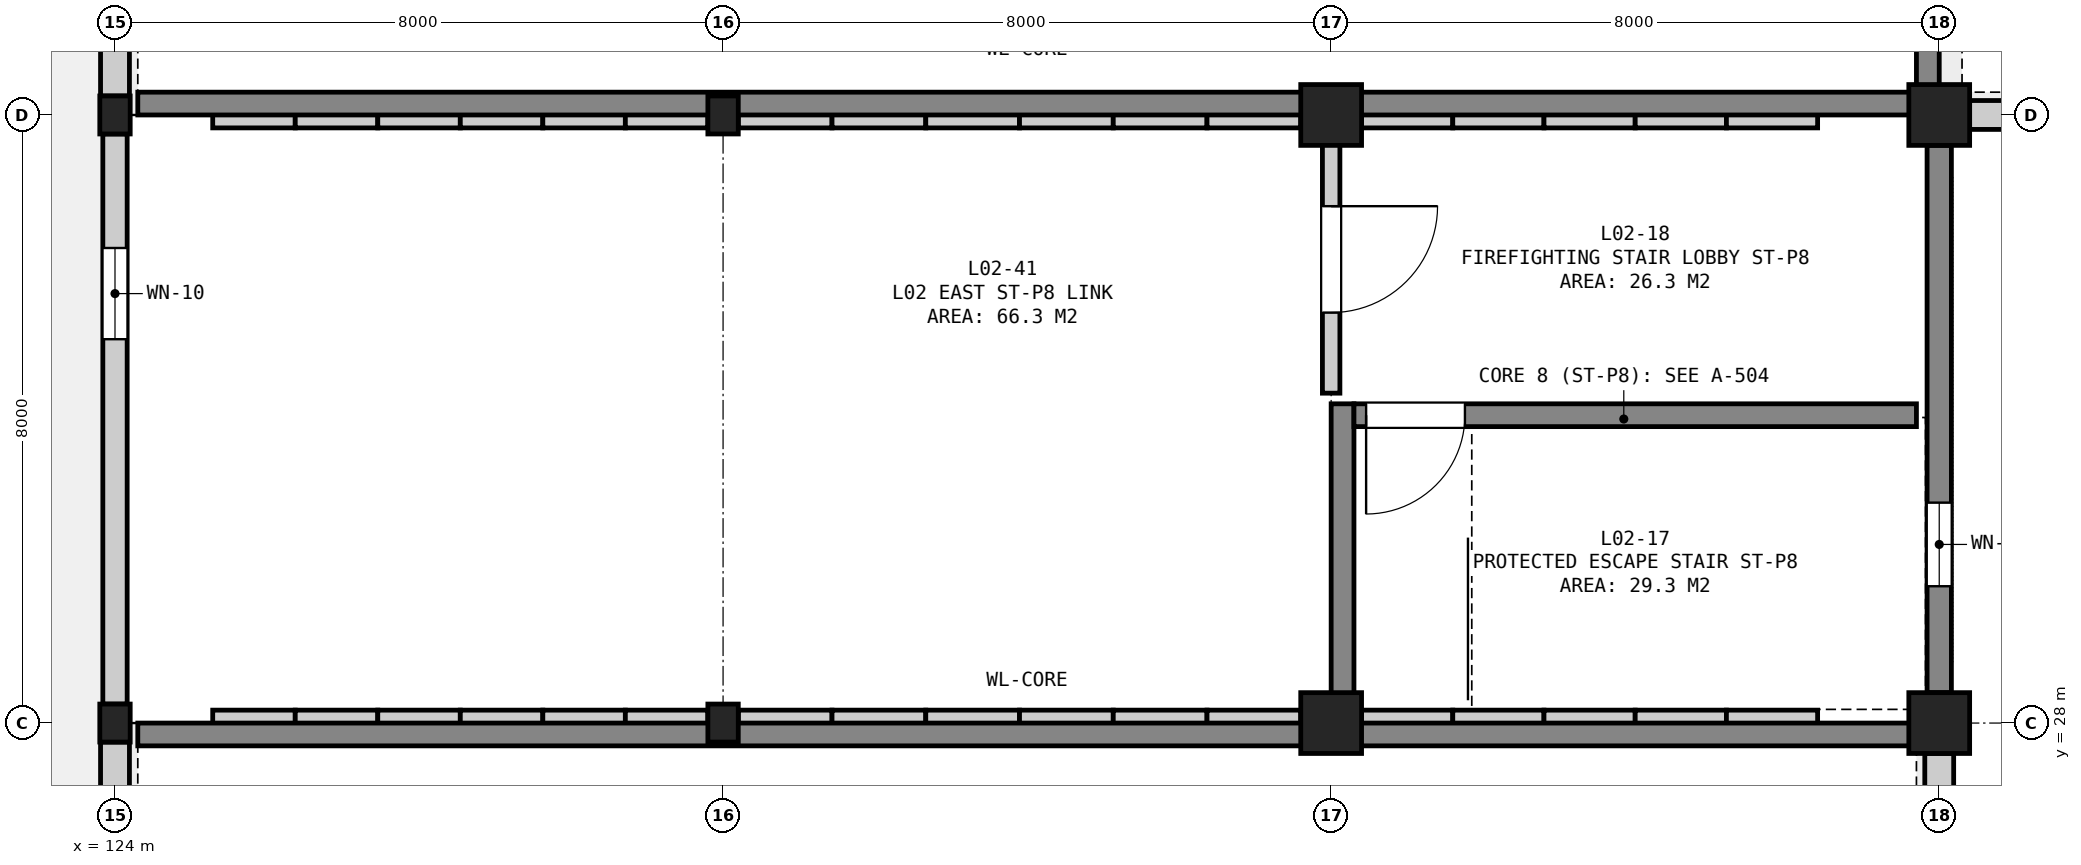
"""IFC4 building model, lengths in metres.
Left out: names, types, materials, properties, quantities, classifications, styles, units other than length and angle.
Written with IfcOpenShell. Run it as: python <this file> out.ifc"""

import sys

from ifc_helpers import new_model, si_unit, direction, frame, frame_2d, origin, origin_2d, place, context, subcontext, project, spatial, rectangle, extrude, element, fill, save


model = new_model("IFC4")
c1 = context("Model", 3, precision=1e-05, world=origin(), true_north=direction((0.0, 1.0)))
c2 = subcontext(c1, "Body", "Model", "MODEL_VIEW")
j1 = project(units=[si_unit("LENGTHUNIT", "METRE"), si_unit("PLANEANGLEUNIT", "RADIAN")], contexts=[c1])
p1 = place(None, origin())
s1 = spatial("IfcSite", under=j1, at=p1, CompositionType="ELEMENT")
p2 = place(p1, origin())
s2 = spatial("IfcBuilding", under=s1, at=p2, CompositionType="ELEMENT")
p3 = place(p2, frame((0.0, 0.0, 10.8)))
s3 = spatial("IfcBuildingStorey", under=s2, at=p3, CompositionType="ELEMENT", Elevation=10.8)
for number, where, z_axis, x_axis in (
    (1, (124.0, 28.0, 0.0), (0.0, 0.0, 1.0), (1.0, 0.0, 0.0)),
    (2, (124.0, 36.0, 0.0), (0.0, 0.0, 1.0), (1.0, 0.0, 0.0)),
    (3, (132.0, 28.0, 0.0), (0.0, 0.0, 1.0), (1.0, 0.0, 0.0)),
    (4, (132.0, 36.0, 0.0), (0.0, 0.0, 1.0), (1.0, 0.0, 0.0)),
):
    element("IfcColumn", number, at=place(p3, frame(where, z_axis=z_axis, x_axis=x_axis)), inside=s3, PredefinedType="COLUMN", context=c2, shape_type="SweptSolid", body=[
        extrude(rectangle(XDim=0.4, YDim=0.5, at=origin_2d()), origin(), (0.0, 0.0, 1.0), 4.8),
    ])
for number, where, z_axis, x_axis in (
    (5, (140.0, 28.0, 0.0), (0.0, 0.0, 1.0), (1.0, 0.0, 0.0)),
    (6, (140.0, 36.0, 0.0), (0.0, 0.0, 1.0), (1.0, 0.0, 0.0)),
    (7, (148.0, 28.0, 0.0), (0.0, 0.0, 1.0), (1.0, 0.0, 0.0)),
    (8, (148.0, 36.0, 0.0), (0.0, 0.0, 1.0), (1.0, 0.0, 0.0)),
):
    element("IfcColumn", number, at=place(p3, frame(where, z_axis=z_axis, x_axis=x_axis)), inside=s3, PredefinedType="COLUMN", context=c2, shape_type="SweptSolid", body=[
        extrude(rectangle(XDim=0.8, YDim=0.8, at=origin_2d()), origin(), (0.0, 0.0, 1.0), 4.8),
    ])
p4 = place(p3, frame((124.0, 42.775, 0.0), z_axis=(0.0, 0.0, 1.0), x_axis=(0.0, -1.0, 0.0)))
e9 = element("IfcWall", 9, at=p4, inside=s3, PredefinedType="SOLIDWALL", context=c2, shape_type="SweptSolid", body=[
    extrude(rectangle(XDim=6.525, YDim=0.38, at=frame_2d((3.262, 0.0))), origin(), (0.0, 0.0, 1.0), 3.95),
])
p5 = place(p3, frame((124.0, 35.75, 0.0), z_axis=(0.0, 0.0, 1.0), x_axis=(0.0, -1.0, 0.0)))
e10 = element("IfcWall", 10, at=p5, inside=s3, PredefinedType="SOLIDWALL", context=c2, shape_type="SweptSolid", body=[
    extrude(rectangle(XDim=7.5, YDim=0.32, at=frame_2d((3.75, 0.0))), origin(), (0.0, 0.0, 1.0), 3.9),
])
p6 = place(p5, frame((1.5, 0.0, 0.9)))
e11 = element("IfcOpeningElement", 11, at=p6, cuts=e10, PredefinedType="OPENING", context=c2, shape_type="SweptSolid", body=[
    extrude(rectangle(XDim=1.2, YDim=1.7, at=frame_2d((0.6, 0.85))), frame((0.0, 0.172, 0.0), z_axis=(0.0, -1.0, 0.0), x_axis=(1.0, 0.0, 0.0)), (0.0, 0.0, 1.0), 0.344),
])
p7 = place(p3, frame((124.0, 27.75, 0.0), z_axis=(0.0, 0.0, 1.0), x_axis=(0.0, -1.0, 0.0)))
e12 = element("IfcWall", 12, at=p7, inside=s3, PredefinedType="SOLIDWALL", context=c2, shape_type="SweptSolid", body=[
    extrude(rectangle(XDim=14.625, YDim=0.38, at=frame_2d((7.312, 0.0))), origin(), (0.0, 0.0, 1.0), 3.7),
])
p8 = place(p3, frame((148.0, 13.05, 0.0), z_axis=(0.0, 0.0, 1.0), x_axis=(0.0, 1.0, 0.0)))
e13 = element("IfcWall", 13, at=p8, inside=s3, PredefinedType="SOLIDWALL", context=c2, shape_type="SweptSolid", body=[
    extrude(rectangle(XDim=14.55, YDim=0.38, at=frame_2d((7.275, 0.0))), origin(), (0.0, 0.0, 1.0), 3.7),
])
p9 = place(p3, frame((148.0, 28.4, 0.0), z_axis=(0.0, 0.0, 1.0), x_axis=(0.0, 1.0, 0.0)))
e14 = element("IfcWall", 14, at=p9, inside=s3, PredefinedType="SOLIDWALL", context=c2, shape_type="SweptSolid", body=[
    extrude(rectangle(XDim=7.2, YDim=0.32, at=frame_2d((3.6, 0.0))), origin(), (0.0, 0.0, 1.0), 3.895),
])
p10 = place(p9, frame((1.4, 0.0, 0.9)))
e15 = element("IfcOpeningElement", 15, at=p10, cuts=e14, PredefinedType="OPENING", context=c2, shape_type="SweptSolid", body=[
    extrude(rectangle(XDim=1.1, YDim=1.55, at=frame_2d((0.55, 0.775))), frame((0.0, 0.172, 0.0), z_axis=(0.0, -1.0, 0.0), x_axis=(1.0, 0.0, 0.0)), (0.0, 0.0, 1.0), 0.344),
])
p11 = place(p3, frame((148.4, 36.0, 0.0), z_axis=(0.0, 0.0, 1.0), x_axis=(1.0, 0.0, 0.0)))
e16 = element("IfcWall", 16, at=p11, inside=s3, PredefinedType="SOLIDWALL", context=c2, shape_type="SweptSolid", body=[
    extrude(rectangle(XDim=12.875, YDim=0.38, at=frame_2d((6.438, 0.0))), origin(), (0.0, 0.0, 1.0), 3.7),
])
p12 = place(p3, frame((125.286, 28.0, 4.8), z_axis=(0.0, 0.0, 1.0), x_axis=(1.0, 0.0, 0.0)))
e17 = element("IfcWall", 17, at=p12, inside=s3, PredefinedType="SOLIDWALL", context=c2, shape_type="SweptSolid", body=[
    extrude(rectangle(XDim=1.086, YDim=0.34, at=frame_2d((0.543, 0.0))), origin(), (0.0, 0.0, 1.0), 0.321),
])
p13 = place(p3, frame((126.371, 28.0, 4.8), z_axis=(0.0, 0.0, 1.0), x_axis=(1.0, 0.0, 0.0)))
e18 = element("IfcWall", 18, at=p13, inside=s3, PredefinedType="SOLIDWALL", context=c2, shape_type="SweptSolid", body=[
    extrude(rectangle(XDim=1.086, YDim=0.34, at=frame_2d((0.543, 0.0))), origin(), (0.0, 0.0, 1.0), 0.591),
])
p14 = place(p3, frame((127.457, 28.0, 4.8), z_axis=(0.0, 0.0, 1.0), x_axis=(1.0, 0.0, 0.0)))
e19 = element("IfcWall", 19, at=p14, inside=s3, PredefinedType="SOLIDWALL", context=c2, shape_type="SweptSolid", body=[
    extrude(rectangle(XDim=1.086, YDim=0.34, at=frame_2d((0.543, 0.0))), origin(), (0.0, 0.0, 1.0), 0.862),
])
p15 = place(p3, frame((128.543, 28.0, 4.8), z_axis=(0.0, 0.0, 1.0), x_axis=(1.0, 0.0, 0.0)))
e20 = element("IfcWall", 20, at=p15, inside=s3, PredefinedType="SOLIDWALL", context=c2, shape_type="SweptSolid", body=[
    extrude(rectangle(XDim=1.086, YDim=0.34, at=frame_2d((0.543, 0.0))), origin(), (0.0, 0.0, 1.0), 1.133),
])
p16 = place(p3, frame((129.629, 28.0, 4.8), z_axis=(0.0, 0.0, 1.0), x_axis=(1.0, 0.0, 0.0)))
e21 = element("IfcWall", 21, at=p16, inside=s3, PredefinedType="SOLIDWALL", context=c2, shape_type="SweptSolid", body=[
    extrude(rectangle(XDim=1.086, YDim=0.34, at=frame_2d((0.543, 0.0))), origin(), (0.0, 0.0, 1.0), 1.403),
])
p17 = place(p3, frame((130.714, 28.0, 4.8), z_axis=(0.0, 0.0, 1.0), x_axis=(1.0, 0.0, 0.0)))
e22 = element("IfcWall", 22, at=p17, inside=s3, PredefinedType="SOLIDWALL", context=c2, shape_type="SweptSolid", body=[
    extrude(rectangle(XDim=1.086, YDim=0.34, at=frame_2d((0.543, 0.0))), origin(), (0.0, 0.0, 1.0), 1.674),
])
p18 = place(p3, frame((132.2, 28.0, 4.8), z_axis=(0.0, 0.0, 1.0), x_axis=(1.0, 0.0, 0.0)))
e23 = element("IfcWall", 23, at=p18, inside=s3, PredefinedType="SOLIDWALL", context=c2, shape_type="SweptSolid", body=[
    extrude(rectangle(XDim=1.233, YDim=0.34, at=frame_2d((0.617, 0.0))), origin(), (0.0, 0.0, 1.0), 2.044),
])
p19 = place(p3, frame((133.433, 28.0, 4.8), z_axis=(0.0, 0.0, 1.0), x_axis=(1.0, 0.0, 0.0)))
e24 = element("IfcWall", 24, at=p19, inside=s3, PredefinedType="SOLIDWALL", context=c2, shape_type="SweptSolid", body=[
    extrude(rectangle(XDim=1.233, YDim=0.34, at=frame_2d((0.617, 0.0))), origin(), (0.0, 0.0, 1.0), 2.352),
])
p20 = place(p3, frame((134.667, 28.0, 4.8), z_axis=(0.0, 0.0, 1.0), x_axis=(1.0, 0.0, 0.0)))
e25 = element("IfcWall", 25, at=p20, inside=s3, PredefinedType="SOLIDWALL", context=c2, shape_type="SweptSolid", body=[
    extrude(rectangle(XDim=1.233, YDim=0.34, at=frame_2d((0.617, 0.0))), origin(), (0.0, 0.0, 1.0), 2.659),
])
p21 = place(p3, frame((135.9, 28.0, 4.8), z_axis=(0.0, 0.0, 1.0), x_axis=(1.0, 0.0, 0.0)))
e26 = element("IfcWall", 26, at=p21, inside=s3, PredefinedType="SOLIDWALL", context=c2, shape_type="SweptSolid", body=[
    extrude(rectangle(XDim=1.233, YDim=0.34, at=frame_2d((0.617, 0.0))), origin(), (0.0, 0.0, 1.0), 2.709),
])
p22 = place(p3, frame((137.133, 28.0, 4.8), z_axis=(0.0, 0.0, 1.0), x_axis=(1.0, 0.0, 0.0)))
e27 = element("IfcWall", 27, at=p22, inside=s3, PredefinedType="SOLIDWALL", context=c2, shape_type="SweptSolid", body=[
    extrude(rectangle(XDim=1.233, YDim=0.34, at=frame_2d((0.617, 0.0))), origin(), (0.0, 0.0, 1.0), 2.402),
])
p23 = place(p3, frame((138.367, 28.0, 4.8), z_axis=(0.0, 0.0, 1.0), x_axis=(1.0, 0.0, 0.0)))
e28 = element("IfcWall", 28, at=p23, inside=s3, PredefinedType="SOLIDWALL", context=c2, shape_type="SweptSolid", body=[
    extrude(rectangle(XDim=1.233, YDim=0.34, at=frame_2d((0.617, 0.0))), origin(), (0.0, 0.0, 1.0), 2.094),
])
p24 = place(p3, frame((140.4, 28.0, 4.8), z_axis=(0.0, 0.0, 1.0), x_axis=(1.0, 0.0, 0.0)))
e29 = element("IfcWall", 29, at=p24, inside=s3, PredefinedType="SOLIDWALL", context=c2, shape_type="SweptSolid", body=[
    extrude(rectangle(XDim=1.2, YDim=0.34, at=frame_2d((0.6, 0.0))), origin(), (0.0, 0.0, 1.0), 1.596),
])
p25 = place(p3, frame((141.6, 28.0, 4.8), z_axis=(0.0, 0.0, 1.0), x_axis=(1.0, 0.0, 0.0)))
e30 = element("IfcWall", 30, at=p25, inside=s3, PredefinedType="SOLIDWALL", context=c2, shape_type="SweptSolid", body=[
    extrude(rectangle(XDim=1.2, YDim=0.34, at=frame_2d((0.6, 0.0))), origin(), (0.0, 0.0, 1.0), 1.296),
])
p26 = place(p3, frame((142.8, 28.0, 4.8), z_axis=(0.0, 0.0, 1.0), x_axis=(1.0, 0.0, 0.0)))
e31 = element("IfcWall", 31, at=p26, inside=s3, PredefinedType="SOLIDWALL", context=c2, shape_type="SweptSolid", body=[
    extrude(rectangle(XDim=1.2, YDim=0.34, at=frame_2d((0.6, 0.0))), origin(), (0.0, 0.0, 1.0), 0.997),
])
p27 = place(p3, frame((144.0, 28.0, 4.8), z_axis=(0.0, 0.0, 1.0), x_axis=(1.0, 0.0, 0.0)))
e32 = element("IfcWall", 32, at=p27, inside=s3, PredefinedType="SOLIDWALL", context=c2, shape_type="SweptSolid", body=[
    extrude(rectangle(XDim=1.2, YDim=0.34, at=frame_2d((0.6, 0.0))), origin(), (0.0, 0.0, 1.0), 0.698),
])
p28 = place(p3, frame((145.2, 28.0, 4.8), z_axis=(0.0, 0.0, 1.0), x_axis=(1.0, 0.0, 0.0)))
e33 = element("IfcWall", 33, at=p28, inside=s3, PredefinedType="SOLIDWALL", context=c2, shape_type="SweptSolid", body=[
    extrude(rectangle(XDim=1.2, YDim=0.34, at=frame_2d((0.6, 0.0))), origin(), (0.0, 0.0, 1.0), 0.399),
])
p29 = place(p3, frame((125.286, 36.0, 4.8), z_axis=(0.0, 0.0, 1.0), x_axis=(1.0, 0.0, 0.0)))
e34 = element("IfcWall", 34, at=p29, inside=s3, PredefinedType="SOLIDWALL", context=c2, shape_type="SweptSolid", body=[
    extrude(rectangle(XDim=1.086, YDim=0.34, at=frame_2d((0.543, 0.0))), origin(), (0.0, 0.0, 1.0), 0.321),
])
p30 = place(p3, frame((126.371, 36.0, 4.8), z_axis=(0.0, 0.0, 1.0), x_axis=(1.0, 0.0, 0.0)))
e35 = element("IfcWall", 35, at=p30, inside=s3, PredefinedType="SOLIDWALL", context=c2, shape_type="SweptSolid", body=[
    extrude(rectangle(XDim=1.086, YDim=0.34, at=frame_2d((0.543, 0.0))), origin(), (0.0, 0.0, 1.0), 0.591),
])
p31 = place(p3, frame((127.457, 36.0, 4.8), z_axis=(0.0, 0.0, 1.0), x_axis=(1.0, 0.0, 0.0)))
e36 = element("IfcWall", 36, at=p31, inside=s3, PredefinedType="SOLIDWALL", context=c2, shape_type="SweptSolid", body=[
    extrude(rectangle(XDim=1.086, YDim=0.34, at=frame_2d((0.543, 0.0))), origin(), (0.0, 0.0, 1.0), 0.862),
])
p32 = place(p3, frame((128.543, 36.0, 4.8), z_axis=(0.0, 0.0, 1.0), x_axis=(1.0, 0.0, 0.0)))
e37 = element("IfcWall", 37, at=p32, inside=s3, PredefinedType="SOLIDWALL", context=c2, shape_type="SweptSolid", body=[
    extrude(rectangle(XDim=1.086, YDim=0.34, at=frame_2d((0.543, 0.0))), origin(), (0.0, 0.0, 1.0), 1.133),
])
p33 = place(p3, frame((129.629, 36.0, 4.8), z_axis=(0.0, 0.0, 1.0), x_axis=(1.0, 0.0, 0.0)))
e38 = element("IfcWall", 38, at=p33, inside=s3, PredefinedType="SOLIDWALL", context=c2, shape_type="SweptSolid", body=[
    extrude(rectangle(XDim=1.086, YDim=0.34, at=frame_2d((0.543, 0.0))), origin(), (0.0, 0.0, 1.0), 1.403),
])
p34 = place(p3, frame((130.714, 36.0, 4.8), z_axis=(0.0, 0.0, 1.0), x_axis=(1.0, 0.0, 0.0)))
e39 = element("IfcWall", 39, at=p34, inside=s3, PredefinedType="SOLIDWALL", context=c2, shape_type="SweptSolid", body=[
    extrude(rectangle(XDim=1.086, YDim=0.34, at=frame_2d((0.543, 0.0))), origin(), (0.0, 0.0, 1.0), 1.674),
])
p35 = place(p3, frame((132.2, 36.0, 4.8), z_axis=(0.0, 0.0, 1.0), x_axis=(1.0, 0.0, 0.0)))
e40 = element("IfcWall", 40, at=p35, inside=s3, PredefinedType="SOLIDWALL", context=c2, shape_type="SweptSolid", body=[
    extrude(rectangle(XDim=1.233, YDim=0.34, at=frame_2d((0.617, 0.0))), origin(), (0.0, 0.0, 1.0), 2.044),
])
p36 = place(p3, frame((133.433, 36.0, 4.8), z_axis=(0.0, 0.0, 1.0), x_axis=(1.0, 0.0, 0.0)))
e41 = element("IfcWall", 41, at=p36, inside=s3, PredefinedType="SOLIDWALL", context=c2, shape_type="SweptSolid", body=[
    extrude(rectangle(XDim=1.233, YDim=0.34, at=frame_2d((0.617, 0.0))), origin(), (0.0, 0.0, 1.0), 2.352),
])
p37 = place(p3, frame((134.667, 36.0, 4.8), z_axis=(0.0, 0.0, 1.0), x_axis=(1.0, 0.0, 0.0)))
e42 = element("IfcWall", 42, at=p37, inside=s3, PredefinedType="SOLIDWALL", context=c2, shape_type="SweptSolid", body=[
    extrude(rectangle(XDim=1.233, YDim=0.34, at=frame_2d((0.617, 0.0))), origin(), (0.0, 0.0, 1.0), 2.659),
])
p38 = place(p3, frame((135.9, 36.0, 4.8), z_axis=(0.0, 0.0, 1.0), x_axis=(1.0, 0.0, 0.0)))
e43 = element("IfcWall", 43, at=p38, inside=s3, PredefinedType="SOLIDWALL", context=c2, shape_type="SweptSolid", body=[
    extrude(rectangle(XDim=1.233, YDim=0.34, at=frame_2d((0.617, 0.0))), origin(), (0.0, 0.0, 1.0), 2.709),
])
p39 = place(p3, frame((137.133, 36.0, 4.8), z_axis=(0.0, 0.0, 1.0), x_axis=(1.0, 0.0, 0.0)))
e44 = element("IfcWall", 44, at=p39, inside=s3, PredefinedType="SOLIDWALL", context=c2, shape_type="SweptSolid", body=[
    extrude(rectangle(XDim=1.233, YDim=0.34, at=frame_2d((0.617, 0.0))), origin(), (0.0, 0.0, 1.0), 2.402),
])
p40 = place(p3, frame((138.367, 36.0, 4.8), z_axis=(0.0, 0.0, 1.0), x_axis=(1.0, 0.0, 0.0)))
e45 = element("IfcWall", 45, at=p40, inside=s3, PredefinedType="SOLIDWALL", context=c2, shape_type="SweptSolid", body=[
    extrude(rectangle(XDim=1.233, YDim=0.34, at=frame_2d((0.617, 0.0))), origin(), (0.0, 0.0, 1.0), 2.094),
])
p41 = place(p3, frame((140.4, 36.0, 4.8), z_axis=(0.0, 0.0, 1.0), x_axis=(1.0, 0.0, 0.0)))
e46 = element("IfcWall", 46, at=p41, inside=s3, PredefinedType="SOLIDWALL", context=c2, shape_type="SweptSolid", body=[
    extrude(rectangle(XDim=1.2, YDim=0.34, at=frame_2d((0.6, 0.0))), origin(), (0.0, 0.0, 1.0), 1.596),
])
p42 = place(p3, frame((141.6, 36.0, 4.8), z_axis=(0.0, 0.0, 1.0), x_axis=(1.0, 0.0, 0.0)))
e47 = element("IfcWall", 47, at=p42, inside=s3, PredefinedType="SOLIDWALL", context=c2, shape_type="SweptSolid", body=[
    extrude(rectangle(XDim=1.2, YDim=0.34, at=frame_2d((0.6, 0.0))), origin(), (0.0, 0.0, 1.0), 1.296),
])
p43 = place(p3, frame((142.8, 36.0, 4.8), z_axis=(0.0, 0.0, 1.0), x_axis=(1.0, 0.0, 0.0)))
e48 = element("IfcWall", 48, at=p43, inside=s3, PredefinedType="SOLIDWALL", context=c2, shape_type="SweptSolid", body=[
    extrude(rectangle(XDim=1.2, YDim=0.34, at=frame_2d((0.6, 0.0))), origin(), (0.0, 0.0, 1.0), 0.997),
])
p44 = place(p3, frame((144.0, 36.0, 4.8), z_axis=(0.0, 0.0, 1.0), x_axis=(1.0, 0.0, 0.0)))
e49 = element("IfcWall", 49, at=p44, inside=s3, PredefinedType="SOLIDWALL", context=c2, shape_type="SweptSolid", body=[
    extrude(rectangle(XDim=1.2, YDim=0.34, at=frame_2d((0.6, 0.0))), origin(), (0.0, 0.0, 1.0), 0.698),
])
p45 = place(p3, frame((145.2, 36.0, 4.8), z_axis=(0.0, 0.0, 1.0), x_axis=(1.0, 0.0, 0.0)))
e50 = element("IfcWall", 50, at=p45, inside=s3, PredefinedType="SOLIDWALL", context=c2, shape_type="SweptSolid", body=[
    extrude(rectangle(XDim=1.2, YDim=0.34, at=frame_2d((0.6, 0.0))), origin(), (0.0, 0.0, 1.0), 0.399),
])
p46 = place(p3, frame((124.3, 27.85, 0.0), z_axis=(0.0, 0.0, 1.0), x_axis=(1.0, 0.0, 0.0)))
e51 = element("IfcWall", 51, at=p46, inside=s3, PredefinedType="SHEAR", context=c2, shape_type="SweptSolid", body=[
    extrude(rectangle(XDim=23.4, YDim=0.3, at=frame_2d((11.7, 0.0))), origin(), (0.0, 0.0, 1.0), 3.9),
])
p47 = place(p3, frame((124.3, 36.15, 0.0), z_axis=(0.0, 0.0, 1.0), x_axis=(1.0, 0.0, 0.0)))
e52 = element("IfcWall", 52, at=p47, inside=s3, PredefinedType="SHEAR", context=c2, shape_type="SweptSolid", body=[
    extrude(rectangle(XDim=23.4, YDim=0.3, at=frame_2d((11.7, 0.0))), origin(), (0.0, 0.0, 1.0), 3.95),
])
p48 = place(p3, frame((147.85, 36.0, 0.0), z_axis=(0.0, 0.0, 1.0), x_axis=(0.0, 1.0, 0.0)))
e53 = element("IfcWall", 53, at=p48, inside=s3, PredefinedType="SHEAR", context=c2, shape_type="SweptSolid", body=[
    extrude(rectangle(XDim=15.2, YDim=0.3, at=frame_2d((7.6, 0.0))), origin(), (0.0, 0.0, 1.0), 3.95),
])
p49 = place(p3, frame((140.15, 28.0, 0.0), z_axis=(0.0, 0.0, 1.0), x_axis=(0.0, 1.0, 0.0)))
e54 = element("IfcWall", 54, at=p49, inside=s3, PredefinedType="SHEAR", context=c2, shape_type="SweptSolid", body=[
    extrude(rectangle(XDim=4.2, YDim=0.3, at=frame_2d((2.1, 0.0))), origin(), (0.0, 0.0, 1.0), 4.5),
])
p50 = place(p3, frame((140.3, 32.05, 0.0), z_axis=(0.0, 0.0, 1.0), x_axis=(1.0, 0.0, 0.0)))
e55 = element("IfcWall", 55, at=p50, inside=s3, PredefinedType="SHEAR", context=c2, shape_type="SweptSolid", body=[
    extrude(rectangle(XDim=7.4, YDim=0.3, at=frame_2d((3.7, 0.0))), origin(), (0.0, 0.0, 1.0), 4.5),
])
p51 = place(p50, frame((0.16, 0.0, 0.0)))
e56 = element("IfcOpeningElement", 56, at=p51, cuts=e55, PredefinedType="OPENING", context=c2, shape_type="SweptSolid", body=[
    extrude(rectangle(XDim=1.3, YDim=2.18, at=frame_2d((0.65, 1.09))), frame((0.0, 0.162, 0.0), z_axis=(0.0, -1.0, 0.0), x_axis=(1.0, 0.0, 0.0)), (0.0, 0.0, 1.0), 0.324),
])
p52 = place(p3, frame((140.0, 32.34, 0.0), z_axis=(0.0, 0.0, 1.0), x_axis=(0.0, 1.0, 0.0)))
e57 = element("IfcWall", 57, at=p52, inside=s3, PredefinedType="SOLIDWALL", context=c2, shape_type="SweptSolid", body=[
    extrude(rectangle(XDim=3.52, YDim=0.23, at=frame_2d((1.76, 0.0))), origin(), (0.0, 0.0, 1.0), 3.695),
])
p53 = place(p52, frame((1.06, 0.0, 0.0)))
e58 = element("IfcOpeningElement", 58, at=p53, cuts=e57, PredefinedType="OPENING", context=c2, shape_type="SweptSolid", body=[
    extrude(rectangle(XDim=1.4, YDim=2.2, at=frame_2d((0.7, 1.1))), frame((0.0, 0.127, 0.0), z_axis=(0.0, -1.0, 0.0), x_axis=(1.0, 0.0, 0.0)), (0.0, 0.0, 1.0), 0.254),
])
p54 = place(p6, origin())
e59 = element("IfcWindow", 59, at=p54, inside=s3, PartitioningType="SINGLE_PANEL", PredefinedType="WINDOW", context=c2, shape_type="SweptSolid", body=[
    extrude(rectangle(XDim=1.2, YDim=1.7, at=frame_2d((0.6, 0.85))), frame((0.0, 0.03, 0.0), z_axis=(0.0, -1.0, 0.0), x_axis=(1.0, 0.0, 0.0)), (0.0, 0.0, 1.0), 0.06),
])
fill(e11, e59)
p55 = place(p10, origin())
e60 = element("IfcWindow", 60, at=p55, inside=s3, PartitioningType="SINGLE_PANEL", PredefinedType="WINDOW", context=c2, shape_type="SweptSolid", body=[
    extrude(rectangle(XDim=1.1, YDim=1.55, at=frame_2d((0.55, 0.775))), frame((0.0, 0.03, 0.0), z_axis=(0.0, -1.0, 0.0), x_axis=(1.0, 0.0, 0.0)), (0.0, 0.0, 1.0), 0.06),
])
fill(e15, e60)
p56 = place(p51, frame((1.3, 0.0, 0.0), z_axis=(0.0, 0.0, 1.0), x_axis=(-1.0, 0.0, 0.0)))
e61 = element("IfcDoor", 61, at=p56, inside=s3, OperationType="SINGLE_SWING_RIGHT", PredefinedType="DOOR", context=c2, shape_type="SweptSolid", body=[
    extrude(rectangle(XDim=1.3, YDim=2.18, at=frame_2d((0.65, 1.09))), frame((0.0, 0.025, 0.0), z_axis=(0.0, -1.0, 0.0), x_axis=(1.0, 0.0, 0.0)), (0.0, 0.0, 1.0), 0.05),
])
fill(e56, e61)
p57 = place(p53, frame((1.4, 0.0, 0.0), z_axis=(0.0, 0.0, 1.0), x_axis=(-1.0, 0.0, 0.0)))
e62 = element("IfcDoor", 62, at=p57, inside=s3, OperationType="SINGLE_SWING_LEFT", PredefinedType="DOOR", context=c2, shape_type="SweptSolid", body=[
    extrude(rectangle(XDim=1.4, YDim=2.2, at=frame_2d((0.7, 1.1))), frame((0.0, 0.025, 0.0), z_axis=(0.0, -1.0, 0.0), x_axis=(1.0, 0.0, 0.0)), (0.0, 0.0, 1.0), 0.05),
])
fill(e58, e62)
save(model, sys.argv[1])
